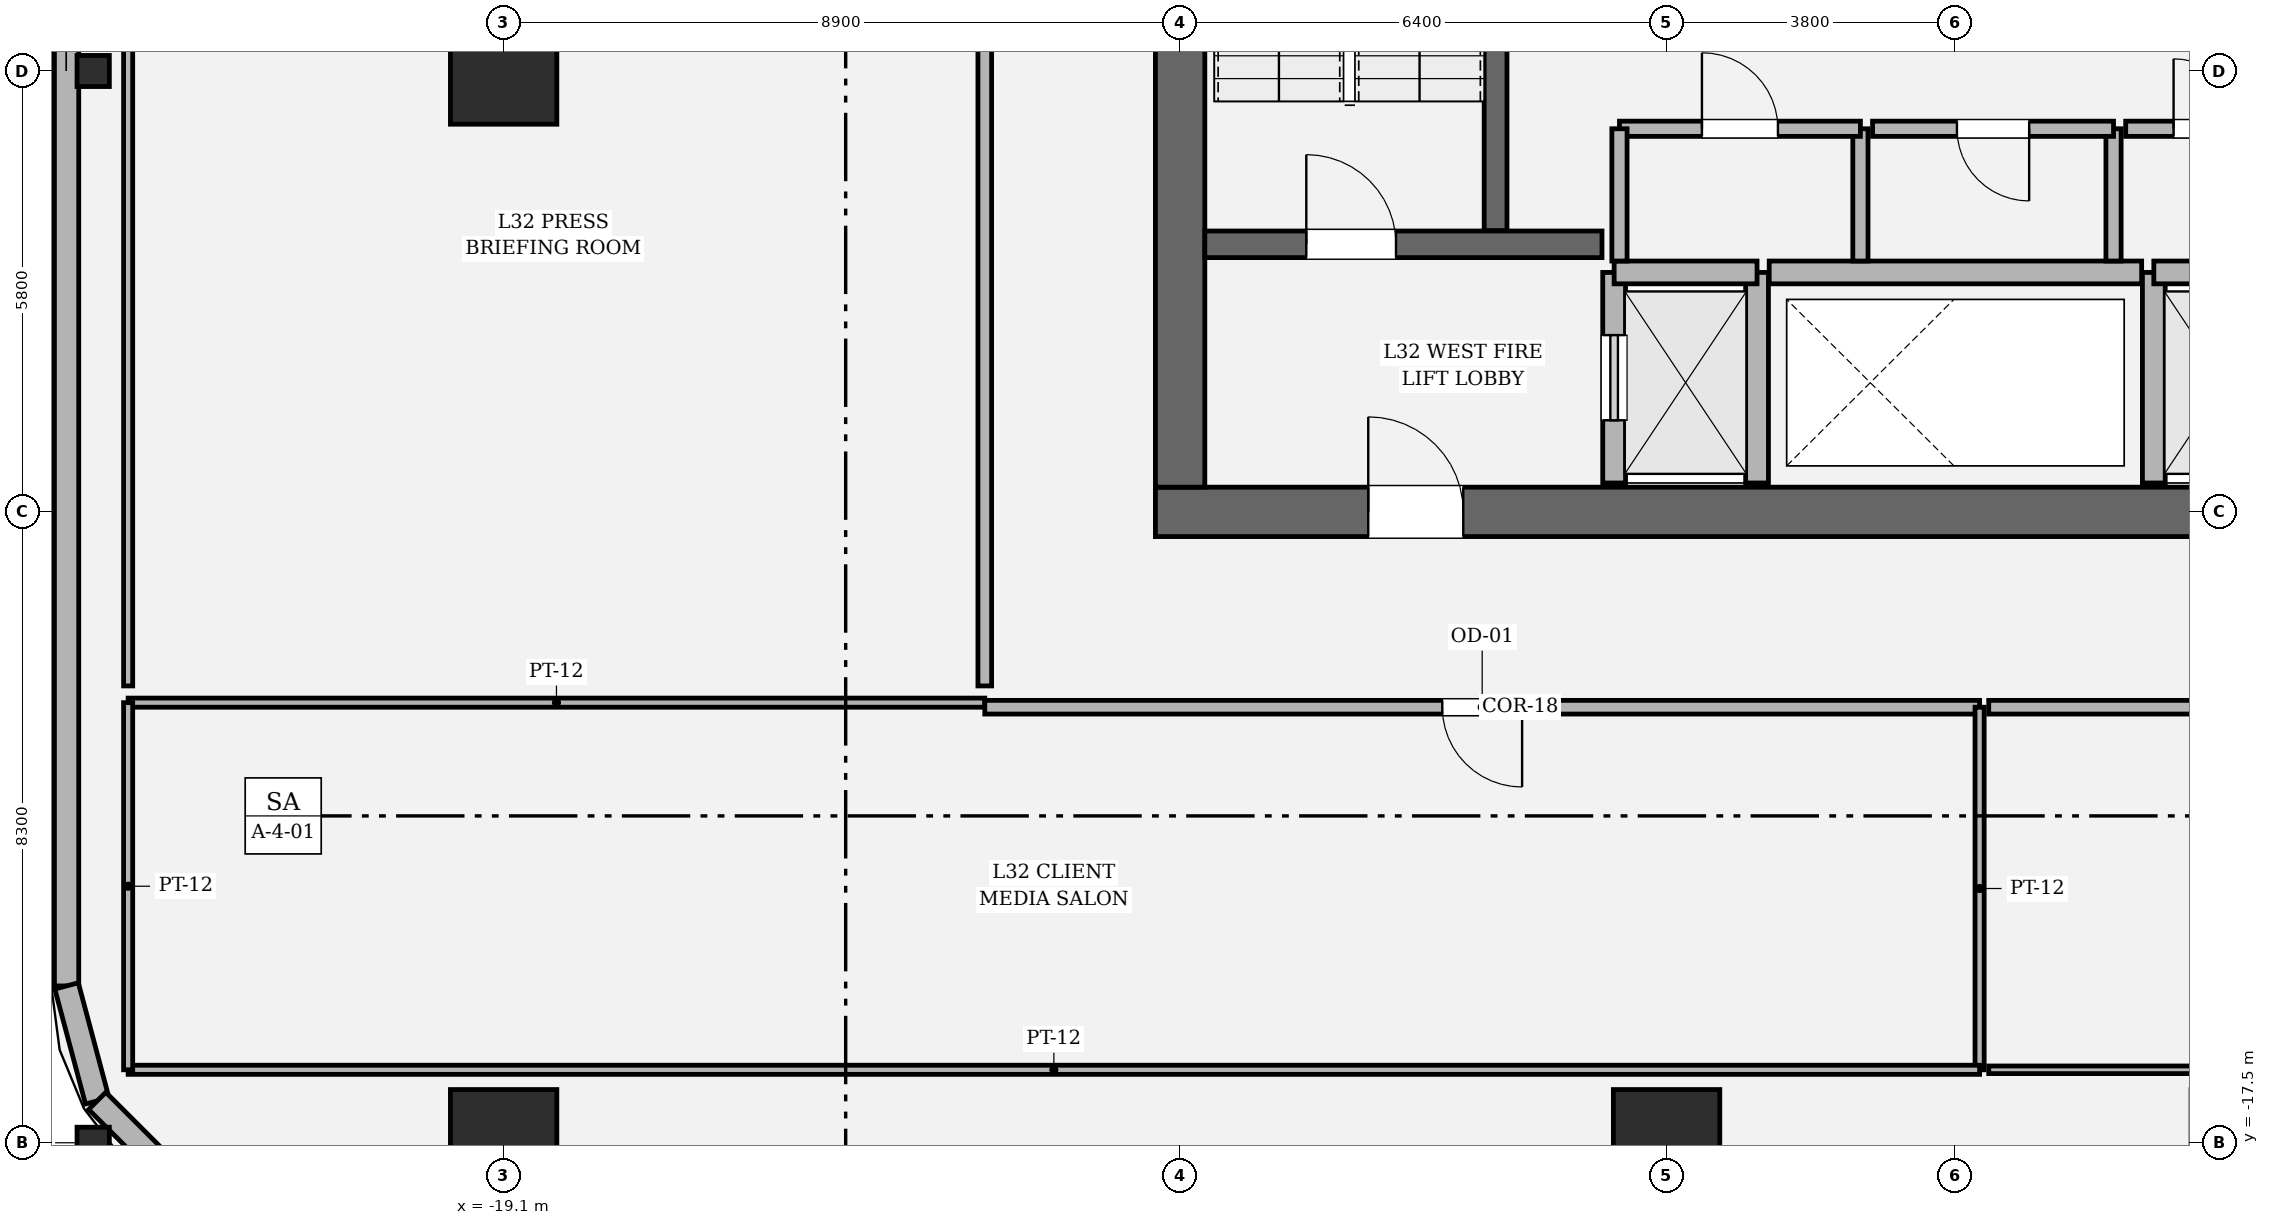
"""IFC4 building model, lengths in metres.
Left out: names, types, materials, properties, quantities, classifications, styles, units other than length and angle.
Written with IfcOpenShell. Run it as: python <this file> out.ifc"""

import sys

from ifc_helpers import new_model, si_unit, direction, frame, frame_2d, origin, origin_2d, place, context, subcontext, project, spatial, rectangle, hollow_rectangle, i_section, extrude, element, fill, save


model = new_model("IFC4")
c1 = context("Model", 3, precision=1e-05, world=origin(), true_north=direction((0.0, 1.0)))
c2 = subcontext(c1, "Body", "Model", "MODEL_VIEW")
j1 = project(units=[si_unit("LENGTHUNIT", "METRE"), si_unit("PLANEANGLEUNIT", "RADIAN")], contexts=[c1])
p1 = place(None, origin())
s1 = spatial("IfcSite", under=j1, at=p1, CompositionType="ELEMENT")
p2 = place(p1, origin())
s2 = spatial("IfcBuilding", under=s1, at=p2, CompositionType="ELEMENT")
p3 = place(p2, frame((0.0, 0.0, 139.8)))
s3 = spatial("IfcBuildingStorey", under=s2, at=p3, CompositionType="ELEMENT", Elevation=139.8)
p4 = place(p3, frame((10.525, -9.2, 0.0), z_axis=(0.0, 0.0, 1.0), x_axis=(-1.0, 0.0, 0.0)))
e1 = element("IfcWall", 1, at=p4, inside=s3, PredefinedType="SHEAR", context=c2, shape_type="SweptSolid", body=[
    extrude(rectangle(XDim=21.05, YDim=0.65, at=frame_2d((10.525, 0.0))), origin(), (0.0, 0.0, 1.0), 4.05),
])
p5 = place(p4, frame((2.8, 0.0, 0.0)))
e2 = element("IfcOpeningElement", 2, at=p5, cuts=e1, PredefinedType="OPENING", context=c2, shape_type="SweptSolid", body=[
    extrude(rectangle(XDim=1.25, YDim=2.25, at=frame_2d((0.625, 1.125))), frame((0.0, 0.335, 0.0), z_axis=(0.0, -1.0, 0.0), x_axis=(1.0, 0.0, 0.0)), (0.0, 0.0, 1.0), 0.67),
])
p6 = place(p4, frame((17.0, 0.0, 0.0)))
e3 = element("IfcOpeningElement", 3, at=p6, cuts=e1, PredefinedType="OPENING", context=c2, shape_type="SweptSolid", body=[
    extrude(rectangle(XDim=1.25, YDim=2.25, at=frame_2d((0.625, 1.125))), frame((0.0, 0.335, 0.0), z_axis=(0.0, -1.0, 0.0), x_axis=(1.0, 0.0, 0.0)), (0.0, 0.0, 1.0), 0.67),
])
p7 = place(p3, frame((-10.2, -8.875, 0.0), z_axis=(0.0, 0.0, 1.0), x_axis=(0.0, 1.0, 0.0)))
e4 = element("IfcWall", 4, at=p7, inside=s3, PredefinedType="SHEAR", context=c2, shape_type="SweptSolid", body=[
    extrude(rectangle(XDim=17.75, YDim=0.65, at=frame_2d((8.875, 0.0))), origin(), (0.0, 0.0, 1.0), 4.05),
])
p8 = place(p7, frame((12.665, 0.0, 0.0)))
e5 = element("IfcOpeningElement", 5, at=p8, cuts=e4, PredefinedType="OPENING", context=c2, shape_type="SweptSolid", body=[
    extrude(rectangle(XDim=1.18, YDim=2.2, at=frame_2d((0.59, 1.1))), frame((0.0, 0.335, 0.0), z_axis=(0.0, -1.0, 0.0), x_axis=(1.0, 0.0, 0.0)), (0.0, 0.0, 1.0), 0.67),
])
p9 = place(p3, frame((-6.05, -5.5, 0.0), z_axis=(0.0, 0.0, 1.0), x_axis=(0.0, 1.0, 0.0)))
e6 = element("IfcWall", 6, at=p9, inside=s3, PredefinedType="SOLIDWALL", context=c2, shape_type="SweptSolid", body=[
    extrude(rectangle(XDim=8.95, YDim=0.3, at=frame_2d((4.475, 0.0))), origin(), (0.0, 0.0, 1.0), 4.05),
])
p10 = place(p3, frame((-9.875, -5.68, 0.0), z_axis=(0.0, 0.0, 1.0), x_axis=(1.0, 0.0, 0.0)))
e7 = element("IfcWall", 7, at=p10, inside=s3, PredefinedType="SOLIDWALL", context=c2, shape_type="SweptSolid", body=[
    extrude(rectangle(XDim=5.225, YDim=0.35, at=frame_2d((2.613, 0.0))), origin(), (0.0, 0.0, 1.0), 4.05),
])
p11 = place(p10, frame((1.335, 0.0, 0.0)))
e8 = element("IfcOpeningElement", 8, at=p11, cuts=e7, PredefinedType="OPENING", context=c2, shape_type="SweptSolid", body=[
    extrude(rectangle(XDim=1.18, YDim=2.2, at=frame_2d((0.59, 1.1))), frame((0.0, 0.185, 0.0), z_axis=(0.0, -1.0, 0.0), x_axis=(1.0, 0.0, 0.0)), (0.0, 0.0, 1.0), 0.37),
])
for number, where, z_axis, x_axis in (
    (9, (-19.1, -17.5, 0.0), (0.0, 0.0, 1.0), (1.0, 0.0, 0.0)),
    (10, (-3.8, -17.5, 0.0), (0.0, 0.0, 1.0), (1.0, 0.0, 0.0)),
    (11, (-19.1, -3.4, 0.0), (0.0, 0.0, 1.0), (1.0, 0.0, 0.0)),
):
    element("IfcColumn", number, at=place(p3, frame(where, z_axis=z_axis, x_axis=x_axis)), inside=s3, PredefinedType="COLUMN", context=c2, shape_type="SweptSolid", body=[
        extrude(hollow_rectangle(XDim=1.4, YDim=1.4, WallThickness=0.042, at=origin_2d()), origin(), (0.0, 0.0, 1.0), 4.05),
    ])
for number, where, z_axis, x_axis in (
    (12, (-24.5, -17.5, 0.0), (0.0, 0.0, 1.0), (0.0, 1.0, 0.0)),
    (13, (-24.5, -3.4, 0.0), (0.0, 0.0, 1.0), (0.0, 1.0, 0.0)),
):
    element("IfcColumn", number, at=place(p3, frame(where, z_axis=z_axis, x_axis=x_axis)), inside=s3, PredefinedType="COLUMN", context=c2, shape_type="SweptSolid", body=[
        extrude(i_section(OverallWidth=0.409, OverallDepth=0.425, WebThickness=0.032, FlangeThickness=0.052, FilletRadius=0.018, at=origin_2d()), origin(), (0.0, 0.0, 1.0), 4.048),
    ])
p12 = place(p3, frame((-24.85, -2.75, 0.0), z_axis=(0.0, 0.0, 1.0), x_axis=(0.0, -1.0, 0.0)))
e14 = element("IfcWall", 14, at=p12, inside=s3, PredefinedType="SOLIDWALL", context=c2, shape_type="SweptSolid", body=[
    extrude(rectangle(XDim=12.687, YDim=0.32, at=frame_2d((6.344, 0.0))), origin(), (0.0, 0.0, 1.0), 2.544),
])
p13 = place(p3, frame((-24.85, -15.437, 0.0), z_axis=(0.0, 0.0, 1.0), x_axis=(0.257847112249, -0.966185730957, 0.0)))
e15 = element("IfcWall", 15, at=p13, inside=s3, PredefinedType="SOLIDWALL", context=c2, shape_type="SweptSolid", body=[
    extrude(rectangle(XDim=1.565, YDim=0.32, at=frame_2d((0.783, 0.0))), origin(), (0.0, 0.0, 1.0), 2.544),
])
p14 = place(p3, frame((-24.447, -16.949, 0.0), z_axis=(0.0, 0.0, 1.0), x_axis=(0.707106781187, -0.707106781187, 0.0)))
e16 = element("IfcWall", 16, at=p14, inside=s3, PredefinedType="SOLIDWALL", context=c2, shape_type="SweptSolid", body=[
    extrude(rectangle(XDim=1.552, YDim=0.32, at=frame_2d((0.776, 0.0))), origin(), (0.0, 0.0, 1.0), 2.504),
])
p15 = place(p3, frame((-4.49, -8.82, 0.0), z_axis=(0.0, 0.0, 1.0), x_axis=(0.0, 1.0, 0.0)))
e17 = element("IfcWall", 17, at=p15, inside=s3, PredefinedType="SOLIDWALL", context=c2, shape_type="SweptSolid", body=[
    extrude(rectangle(XDim=2.77, YDim=0.3, at=frame_2d((1.385, 0.0))), origin(), (0.0, 0.0, 1.0), 3.83),
])
p16 = place(p15, frame((0.825, 0.0, 0.0)))
e18 = element("IfcOpeningElement", 18, at=p16, cuts=e17, PredefinedType="OPENING", context=c2, shape_type="SweptSolid", body=[
    extrude(rectangle(XDim=1.12, YDim=2.25, at=frame_2d((0.56, 1.125))), frame((0.0, 0.16, 0.0), z_axis=(0.0, -1.0, 0.0), x_axis=(1.0, 0.0, 0.0)), (0.0, 0.0, 1.0), 0.32),
])
p17 = place(p3, frame((-2.61, -8.82, 0.0), z_axis=(0.0, 0.0, 1.0), x_axis=(0.0, 1.0, 0.0)))
e19 = element("IfcWall", 19, at=p17, inside=s3, PredefinedType="SOLIDWALL", context=c2, shape_type="SweptSolid", body=[
    extrude(rectangle(XDim=2.77, YDim=0.3, at=frame_2d((1.385, 0.0))), origin(), (0.0, 0.0, 1.0), 3.83),
])
p18 = place(p3, frame((-4.49, -6.05, 0.0), z_axis=(0.0, 0.0, 1.0), x_axis=(1.0, 0.0, 0.0)))
e20 = element("IfcWall", 20, at=p18, inside=s3, PredefinedType="SOLIDWALL", context=c2, shape_type="SweptSolid", body=[
    extrude(rectangle(XDim=1.88, YDim=0.3, at=frame_2d((0.94, 0.0))), origin(), (0.0, 0.0, 1.0), 3.83),
])
p19 = place(p3, frame((2.61, -8.82, 0.0), z_axis=(0.0, 0.0, 1.0), x_axis=(0.0, 1.0, 0.0)))
e21 = element("IfcWall", 21, at=p19, inside=s3, PredefinedType="SOLIDWALL", context=c2, shape_type="SweptSolid", body=[
    extrude(rectangle(XDim=2.77, YDim=0.3, at=frame_2d((1.385, 0.0))), origin(), (0.0, 0.0, 1.0), 3.83),
])
p20 = place(p3, frame((2.61, -6.05, 0.0), z_axis=(0.0, 0.0, 1.0), x_axis=(1.0, 0.0, 0.0)))
e22 = element("IfcWall", 22, at=p20, inside=s3, PredefinedType="SOLIDWALL", context=c2, shape_type="SweptSolid", body=[
    extrude(rectangle(XDim=1.88, YDim=0.3, at=frame_2d((0.94, 0.0))), origin(), (0.0, 0.0, 1.0), 3.83),
])
p21 = place(p3, frame((-2.45, -6.05, 0.0), z_axis=(0.0, 0.0, 1.0), x_axis=(1.0, 0.0, 0.0)))
e23 = element("IfcWall", 23, at=p21, inside=s3, PredefinedType="SOLIDWALL", context=c2, shape_type="SweptSolid", body=[
    extrude(rectangle(XDim=4.9, YDim=0.3, at=frame_2d((2.45, 0.0))), origin(), (0.0, 0.0, 1.0), 3.83),
])
p22 = place(p3, frame((-1.25, -5.9, 0.0), z_axis=(0.0, 0.0, 1.0), x_axis=(0.0, 1.0, 0.0)))
e24 = element("IfcWall", 24, at=p22, inside=s3, PredefinedType="SOLIDWALL", context=c2, shape_type="SweptSolid", body=[
    extrude(rectangle(XDim=1.74, YDim=0.2, at=frame_2d((0.87, 0.0))), origin(), (0.0, 0.0, 1.0), 3.83),
])
p23 = place(p3, frame((-1.25, -4.16, 0.0), z_axis=(0.0, 0.0, 1.0), x_axis=(-1.0, 0.0, 0.0)))
e25 = element("IfcWall", 25, at=p23, inside=s3, PredefinedType="SOLIDWALL", context=c2, shape_type="SweptSolid", body=[
    extrude(rectangle(XDim=3.17, YDim=0.2, at=frame_2d((1.585, 0.0))), origin(), (0.0, 0.0, 1.0), 3.83),
])
p24 = place(p23, frame((1.085, 0.0, 0.0)))
e26 = element("IfcOpeningElement", 26, at=p24, cuts=e25, PredefinedType="OPENING", context=c2, shape_type="SweptSolid", body=[
    extrude(rectangle(XDim=1.0, YDim=2.15, at=frame_2d((0.5, 1.075))), frame((0.0, 0.11, 0.0), z_axis=(0.0, -1.0, 0.0), x_axis=(1.0, 0.0, 0.0)), (0.0, 0.0, 1.0), 0.22),
])
for number, where, z_axis, x_axis in (
    (27, (-4.42, -4.16, 0.0), (0.0, 0.0, 1.0), (0.0, -1.0, 0.0)),
    (28, (2.08, -5.9, 0.0), (0.0, 0.0, 1.0), (0.0, 1.0, 0.0)),
):
    element("IfcWall", number, at=place(p3, frame(where, z_axis=z_axis, x_axis=x_axis)), inside=s3, PredefinedType="SOLIDWALL", context=c2, shape_type="SweptSolid", body=[
        extrude(rectangle(XDim=1.74, YDim=0.2, at=frame_2d((0.87, 0.0))), origin(), (0.0, 0.0, 1.0), 3.83),
    ])
p25 = place(p3, frame((2.08, -4.16, 0.0), z_axis=(0.0, 0.0, 1.0), x_axis=(-1.0, 0.0, 0.0)))
e29 = element("IfcWall", 29, at=p25, inside=s3, PredefinedType="SOLIDWALL", context=c2, shape_type="SweptSolid", body=[
    extrude(rectangle(XDim=3.17, YDim=0.2, at=frame_2d((1.585, 0.0))), origin(), (0.0, 0.0, 1.0), 3.83),
])
p26 = place(p25, frame((1.11, 0.0, 0.0)))
e30 = element("IfcOpeningElement", 30, at=p26, cuts=e29, PredefinedType="OPENING", context=c2, shape_type="SweptSolid", body=[
    extrude(rectangle(XDim=0.95, YDim=2.15, at=frame_2d((0.475, 1.075))), frame((0.0, 0.11, 0.0), z_axis=(0.0, -1.0, 0.0), x_axis=(1.0, 0.0, 0.0)), (0.0, 0.0, 1.0), 0.22),
])
p27 = place(p3, frame((4.42, -4.16, 0.0), z_axis=(0.0, 0.0, 1.0), x_axis=(-1.0, 0.0, 0.0)))
e31 = element("IfcWall", 31, at=p27, inside=s3, PredefinedType="SOLIDWALL", context=c2, shape_type="SweptSolid", body=[
    extrude(rectangle(XDim=2.18, YDim=0.2, at=frame_2d((1.09, 0.0))), origin(), (0.0, 0.0, 1.0), 3.83),
])
p28 = place(p27, frame((0.63, 0.0, 0.0)))
e32 = element("IfcOpeningElement", 32, at=p28, cuts=e31, PredefinedType="OPENING", context=c2, shape_type="SweptSolid", body=[
    extrude(rectangle(XDim=0.92, YDim=2.1, at=frame_2d((0.46, 1.05))), frame((0.0, 0.11, 0.0), z_axis=(0.0, -1.0, 0.0), x_axis=(1.0, 0.0, 0.0)), (0.0, 0.0, 1.0), 0.22),
])
p29 = place(p3, frame((-24.04, -11.71, 0.0), z_axis=(0.0, 0.0, 1.0), x_axis=(1.0, 0.0, 0.0)))
e33 = element("IfcWall", 33, at=p29, inside=s3, PredefinedType="PARTITIONING", context=c2, shape_type="SweptSolid", body=[
    extrude(rectangle(XDim=11.27, YDim=0.12, at=frame_2d((5.635, 0.0))), origin(), (0.0, 0.0, 1.0), 3.174),
])
p30 = place(p3, frame((-12.77, -11.77, 0.0), z_axis=(0.0, 0.0, 1.0), x_axis=(1.0, 0.0, 0.0)))
e34 = element("IfcWall", 34, at=p30, inside=s3, PredefinedType="PARTITIONING", context=c2, shape_type="SweptSolid", body=[
    extrude(rectangle(XDim=13.088, YDim=0.18, at=frame_2d((6.544, 0.0))), origin(), (0.0, 0.0, 1.0), 3.174),
])
p31 = place(p30, frame((6.019, 0.0, 0.0)))
e35 = element("IfcOpeningElement", 35, at=p31, cuts=e34, PredefinedType="OPENING", context=c2, shape_type="SweptSolid", body=[
    extrude(rectangle(XDim=1.05, YDim=2.2, at=frame_2d((0.525, 1.1))), frame((0.0, 0.1, 0.0), z_axis=(0.0, -1.0, 0.0), x_axis=(1.0, 0.0, 0.0)), (0.0, 0.0, 1.0), 0.2),
])
p32 = place(p3, frame((0.318, -11.77, 0.0), z_axis=(0.0, 0.0, 1.0), x_axis=(0.0, -1.0, 0.0)))
e36 = element("IfcWall", 36, at=p32, inside=s3, PredefinedType="PARTITIONING", context=c2, shape_type="SweptSolid", body=[
    extrude(rectangle(XDim=4.77, YDim=0.12, at=frame_2d((2.385, 0.0))), origin(), (0.0, 0.0, 1.0), 3.83),
])
p33 = place(p3, frame((0.318, -16.54, 0.0), z_axis=(0.0, 0.0, 1.0), x_axis=(-1.0, 0.0, 0.0)))
e37 = element("IfcWall", 37, at=p33, inside=s3, PredefinedType="PARTITIONING", context=c2, shape_type="SweptSolid", body=[
    extrude(rectangle(XDim=24.358, YDim=0.12, at=frame_2d((12.179, 0.0))), origin(), (0.0, 0.0, 1.0), 3.174),
])
p34 = place(p3, frame((-24.04, -16.54, 0.0), z_axis=(0.0, 0.0, 1.0), x_axis=(0.0, 1.0, 0.0)))
e38 = element("IfcWall", 38, at=p34, inside=s3, PredefinedType="PARTITIONING", context=c2, shape_type="SweptSolid", body=[
    extrude(rectangle(XDim=4.83, YDim=0.12, at=frame_2d((2.415, 0.0))), origin(), (0.0, 0.0, 1.0), 3.83),
])
p35 = place(p3, frame((0.438, -11.77, 0.0), z_axis=(0.0, 0.0, 1.0), x_axis=(1.0, 0.0, 0.0)))
e39 = element("IfcWall", 39, at=p35, inside=s3, PredefinedType="PARTITIONING", context=c2, shape_type="SweptSolid", body=[
    extrude(rectangle(XDim=12.332, YDim=0.18, at=frame_2d((6.166, 0.0))), origin(), (0.0, 0.0, 1.0), 3.174),
])
p36 = place(p35, frame((5.466, 0.0, 0.0)))
e40 = element("IfcOpeningElement", 40, at=p36, cuts=e39, PredefinedType="OPENING", context=c2, shape_type="SweptSolid", body=[
    extrude(rectangle(XDim=1.4, YDim=2.25, at=frame_2d((0.7, 1.125))), frame((0.0, 0.1, 0.0), z_axis=(0.0, -1.0, 0.0), x_axis=(1.0, 0.0, 0.0)), (0.0, 0.0, 1.0), 0.2),
])
p37 = place(p3, frame((18.14, -16.54, 0.0), z_axis=(0.0, 0.0, 1.0), x_axis=(-1.0, 0.0, 0.0)))
e41 = element("IfcWall", 41, at=p37, inside=s3, PredefinedType="PARTITIONING", context=c2, shape_type="SweptSolid", body=[
    extrude(rectangle(XDim=17.702, YDim=0.1, at=frame_2d((8.851, 0.0))), origin(), (0.0, 0.0, 1.0), 3.174),
])
p38 = place(p3, frame((-24.04, -11.49, 0.0), z_axis=(0.0, 0.0, 1.0), x_axis=(0.0, 1.0, 0.0)))
e42 = element("IfcWall", 42, at=p38, inside=s3, PredefinedType="PARTITIONING", context=c2, shape_type="SweptSolid", body=[
    extrude(rectangle(XDim=22.6, YDim=0.12, at=frame_2d((11.3, 0.0))), origin(), (0.0, 0.0, 1.0), 2.504),
])
p39 = place(p3, frame((-12.77, 11.11, 0.0), z_axis=(0.0, 0.0, 1.0), x_axis=(0.0, -1.0, 0.0)))
e43 = element("IfcWall", 43, at=p39, inside=s3, PredefinedType="PARTITIONING", context=c2, shape_type="SweptSolid", body=[
    extrude(rectangle(XDim=22.6, YDim=0.18, at=frame_2d((11.3, 0.0))), origin(), (0.0, 0.0, 1.0), 3.174),
])
p40 = place(p39, frame((10.6, 0.0, 0.0)))
e44 = element("IfcOpeningElement", 44, at=p40, cuts=e43, PredefinedType="OPENING", context=c2, shape_type="SweptSolid", body=[
    extrude(rectangle(XDim=1.4, YDim=2.25, at=frame_2d((0.7, 1.125))), frame((0.0, 0.1, 0.0), z_axis=(0.0, -1.0, 0.0), x_axis=(1.0, 0.0, 0.0)), (0.0, 0.0, 1.0), 0.2),
])
p41 = place(p11, origin())
e45 = element("IfcDoor", 45, at=p41, inside=s3, OperationType="SINGLE_SWING_LEFT", PredefinedType="DOOR", context=c2, shape_type="SweptSolid", body=[
    extrude(rectangle(XDim=1.18, YDim=2.2, at=frame_2d((0.59, 1.1))), frame((0.0, 0.025, 0.0), z_axis=(0.0, -1.0, 0.0), x_axis=(1.0, 0.0, 0.0)), (0.0, 0.0, 1.0), 0.05),
])
fill(e8, e45)
p42 = place(p6, origin())
e46 = element("IfcDoor", 46, at=p42, inside=s3, OperationType="SINGLE_SWING_RIGHT", PredefinedType="DOOR", context=c2, shape_type="SweptSolid", body=[
    extrude(rectangle(XDim=1.25, YDim=2.25, at=frame_2d((0.625, 1.125))), frame((0.0, 0.025, 0.0), z_axis=(0.0, -1.0, 0.0), x_axis=(1.0, 0.0, 0.0)), (0.0, 0.0, 1.0), 0.05),
])
fill(e3, e46)
p43 = place(p16, origin())
e47 = element("IfcDoor", 47, at=p43, inside=s3, OperationType="SLIDING_TO_LEFT", PredefinedType="DOOR", context=c2, shape_type="SweptSolid", body=[
    extrude(rectangle(XDim=1.12, YDim=2.25, at=frame_2d((0.56, 1.125))), frame((0.0, 0.025, 0.0), z_axis=(0.0, -1.0, 0.0), x_axis=(1.0, 0.0, 0.0)), (0.0, 0.0, 1.0), 0.05),
])
fill(e18, e47)
p44 = place(p24, origin())
e48 = element("IfcDoor", 48, at=p44, inside=s3, OperationType="SINGLE_SWING_RIGHT", PredefinedType="DOOR", context=c2, shape_type="SweptSolid", body=[
    extrude(rectangle(XDim=1.0, YDim=2.15, at=frame_2d((0.5, 1.075))), frame((0.0, 0.025, 0.0), z_axis=(0.0, -1.0, 0.0), x_axis=(1.0, 0.0, 0.0)), (0.0, 0.0, 1.0), 0.05),
])
fill(e26, e48)
p45 = place(p26, origin())
e49 = element("IfcDoor", 49, at=p45, inside=s3, OperationType="SINGLE_SWING_LEFT", PredefinedType="DOOR", context=c2, shape_type="SweptSolid", body=[
    extrude(rectangle(XDim=0.95, YDim=2.15, at=frame_2d((0.475, 1.075))), frame((0.0, 0.025, 0.0), z_axis=(0.0, -1.0, 0.0), x_axis=(1.0, 0.0, 0.0)), (0.0, 0.0, 1.0), 0.05),
])
fill(e30, e49)
p46 = place(p28, origin())
e50 = element("IfcDoor", 50, at=p46, inside=s3, OperationType="SINGLE_SWING_RIGHT", PredefinedType="DOOR", context=c2, shape_type="SweptSolid", body=[
    extrude(rectangle(XDim=0.92, YDim=2.1, at=frame_2d((0.46, 1.05))), frame((0.0, 0.025, 0.0), z_axis=(0.0, -1.0, 0.0), x_axis=(1.0, 0.0, 0.0)), (0.0, 0.0, 1.0), 0.05),
])
fill(e32, e50)
p47 = place(p31, origin())
e51 = element("IfcDoor", 51, at=p47, inside=s3, OperationType="SINGLE_SWING_RIGHT", PredefinedType="DOOR", context=c2, shape_type="SweptSolid", body=[
    extrude(rectangle(XDim=1.05, YDim=2.2, at=frame_2d((0.525, 1.1))), frame((0.0, 0.025, 0.0), z_axis=(0.0, -1.0, 0.0), x_axis=(1.0, 0.0, 0.0)), (0.0, 0.0, 1.0), 0.05),
])
fill(e35, e51)
save(model, sys.argv[1])
